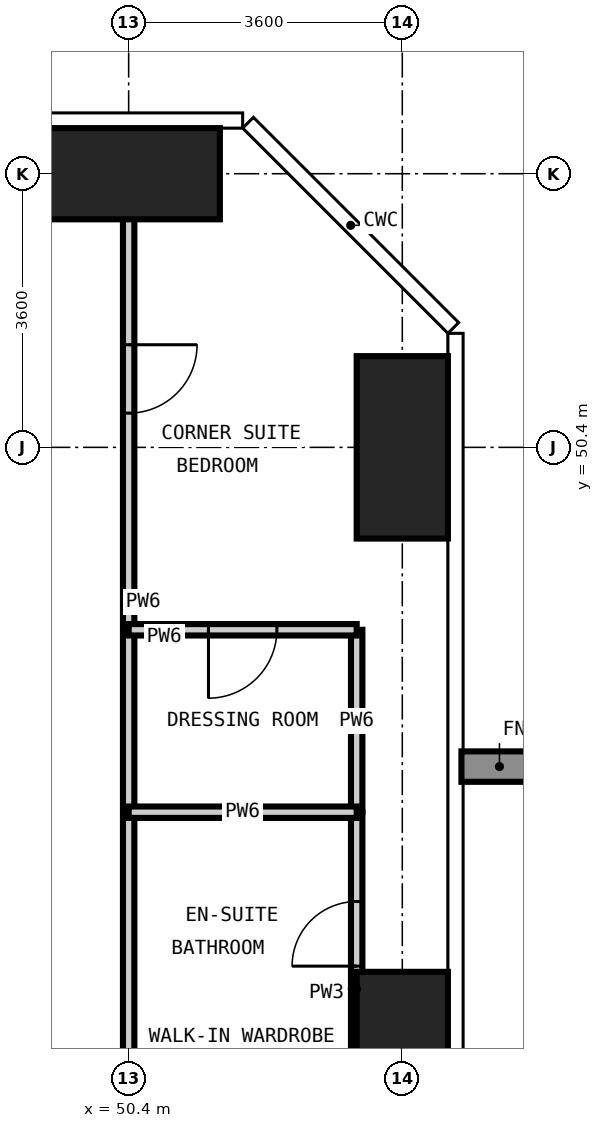
"""IFC4 building model, lengths in metres.
Left out: names, types, materials, properties, quantities, classifications, styles, units other than length and angle.
Written with IfcOpenShell. Run it as: python <this file> out.ifc"""

import sys

from ifc_helpers import new_model, si_unit, direction, frame, frame_2d, origin, origin_2d, place, context, subcontext, project, spatial, rectangle, extrude, element, fill, save


model = new_model("IFC4")
c1 = context("Model", 3, precision=1e-05, world=origin(), true_north=direction((0.0, 1.0)))
c2 = subcontext(c1, "Body", "Model", "MODEL_VIEW")
j1 = project(units=[si_unit("LENGTHUNIT", "METRE"), si_unit("PLANEANGLEUNIT", "RADIAN")], contexts=[c1])
p1 = place(None, origin())
s1 = spatial("IfcSite", under=j1, at=p1, CompositionType="ELEMENT")
p2 = place(p1, origin())
s2 = spatial("IfcBuilding", under=s1, at=p2, CompositionType="ELEMENT")
p3 = place(p2, frame((0.0, 0.0, 216.6)))
s3 = spatial("IfcBuildingStorey", under=s2, at=p3, CompositionType="ELEMENT", Elevation=216.6)
p4 = place(p3, frame((50.4, 54.0, -0.35), z_axis=(0.0, 0.0, 1.0), x_axis=(1.0, 0.0, 0.0)))
e1 = element("IfcColumn", 1, at=p4, inside=s3, PredefinedType="COLUMN", context=c2, shape_type="SweptSolid", body=[
    extrude(rectangle(XDim=2.4, YDim=1.2, at=origin_2d()), origin(), (0.0, 0.0, 1.0), 3.55),
])
p5 = place(p3, frame((54.0, 42.0, -0.35), z_axis=(0.0, 0.0, 1.0), x_axis=(1.0, 0.0, 0.0)))
e2 = element("IfcColumn", 2, at=p5, inside=s3, PredefinedType="COLUMN", context=c2, shape_type="SweptSolid", body=[
    extrude(rectangle(XDim=1.2, YDim=3.0, at=origin_2d()), origin(), (0.0, 0.0, 1.0), 3.55),
])
p6 = place(p3, frame((54.0, 50.4, -0.35), z_axis=(0.0, 0.0, 1.0), x_axis=(1.0, 0.0, 0.0)))
e3 = element("IfcColumn", 3, at=p6, inside=s3, PredefinedType="COLUMN", context=c2, shape_type="SweptSolid", body=[
    extrude(rectangle(XDim=1.2, YDim=2.4, at=origin_2d()), origin(), (0.0, 0.0, 1.0), 3.55),
])
p7 = place(p3, frame((53.4, 42.0, 0.0), z_axis=(0.0, 0.0, 1.0), x_axis=(0.0, 1.0, 0.0)))
e4 = element("IfcWall", 4, at=p7, inside=s3, PredefinedType="PARTITIONING", context=c2, shape_type="SweptSolid", body=[
    extrude(rectangle(XDim=3.6, YDim=0.15, at=frame_2d((1.8, 0.0))), origin(), (0.0, 0.0, 1.0), 3.2),
])
p8 = place(p7, frame((1.575, 0.0, 0.0)))
e5 = element("IfcOpeningElement", 5, at=p8, cuts=e4, PredefinedType="OPENING", context=c2, shape_type="SweptSolid", body=[
    extrude(rectangle(XDim=0.85, YDim=2.1, at=frame_2d((0.425, 1.05))), frame((0.0, 0.085, 0.0), z_axis=(0.0, -1.0, 0.0), x_axis=(1.0, 0.0, 0.0)), (0.0, 0.0, 1.0), 0.17),
])
p9 = place(p3, frame((50.4, 42.0, 0.0), z_axis=(0.0, 0.0, 1.0), x_axis=(0.0, 1.0, 0.0)))
e6 = element("IfcWall", 6, at=p9, inside=s3, PredefinedType="PARTITIONING", context=c2, shape_type="SweptSolid", body=[
    extrude(rectangle(XDim=12.618, YDim=0.15, at=frame_2d((6.309, 0.0))), origin(), (0.0, 0.0, 1.0), 3.2),
])
p10 = place(p9, frame((8.85, 0.0, 0.0)))
e7 = element("IfcOpeningElement", 7, at=p10, cuts=e6, PredefinedType="OPENING", context=c2, shape_type="SweptSolid", body=[
    extrude(rectangle(XDim=0.9, YDim=2.1, at=frame_2d((0.45, 1.05))), frame((0.0, 0.085, 0.0), z_axis=(0.0, -1.0, 0.0), x_axis=(1.0, 0.0, 0.0)), (0.0, 0.0, 1.0), 0.17),
])
p11 = place(p3, frame((53.4, 45.6, 0.0), z_axis=(0.0, 0.0, 1.0), x_axis=(0.0, 1.0, 0.0)))
e8 = element("IfcWall", 8, at=p11, inside=s3, PredefinedType="PARTITIONING", context=c2, shape_type="SweptSolid", body=[
    extrude(rectangle(XDim=2.4, YDim=0.15, at=frame_2d((1.2, 0.0))), origin(), (0.0, 0.0, 1.0), 3.2),
])
p12 = place(p3, frame((50.4, 45.6, 0.0), z_axis=(0.0, 0.0, 1.0), x_axis=(1.0, 0.0, 0.0)))
e9 = element("IfcWall", 9, at=p12, inside=s3, PredefinedType="PARTITIONING", context=c2, shape_type="SweptSolid", body=[
    extrude(rectangle(XDim=3.0, YDim=0.15, at=frame_2d((1.5, 0.0))), origin(), (0.0, 0.0, 1.0), 3.2),
])
p13 = place(p3, frame((50.4, 48.0, 0.0), z_axis=(0.0, 0.0, 1.0), x_axis=(1.0, 0.0, 0.0)))
e10 = element("IfcWall", 10, at=p13, inside=s3, PredefinedType="PARTITIONING", context=c2, shape_type="SweptSolid", body=[
    extrude(rectangle(XDim=3.0, YDim=0.15, at=frame_2d((1.5, 0.0))), origin(), (0.0, 0.0, 1.0), 3.2),
])
p14 = place(p13, frame((1.05, 0.0, 0.0)))
e11 = element("IfcOpeningElement", 11, at=p14, cuts=e10, PredefinedType="OPENING", context=c2, shape_type="SweptSolid", body=[
    extrude(rectangle(XDim=0.9, YDim=2.1, at=frame_2d((0.45, 1.05))), frame((0.0, 0.085, 0.0), z_axis=(0.0, -1.0, 0.0), x_axis=(1.0, 0.0, 0.0)), (0.0, 0.0, 1.0), 0.17),
])
p15 = place(p10, frame((0.9, 0.0, 0.0), z_axis=(0.0, 0.0, 1.0), x_axis=(-1.0, 0.0, 0.0)))
e12 = element("IfcDoor", 12, at=p15, inside=s3, OperationType="SINGLE_SWING_LEFT", PredefinedType="DOOR", context=c2, shape_type="SweptSolid", body=[
    extrude(rectangle(XDim=0.9, YDim=2.1, at=frame_2d((0.45, 1.05))), frame((0.0, 0.025, 0.0), z_axis=(0.0, -1.0, 0.0), x_axis=(1.0, 0.0, 0.0)), (0.0, 0.0, 1.0), 0.05),
])
fill(e7, e12)
p16 = place(p8, origin())
e13 = element("IfcDoor", 13, at=p16, inside=s3, OperationType="SINGLE_SWING_LEFT", PredefinedType="DOOR", context=c2, shape_type="SweptSolid", body=[
    extrude(rectangle(XDim=0.85, YDim=2.1, at=frame_2d((0.425, 1.05))), frame((0.0, 0.025, 0.0), z_axis=(0.0, -1.0, 0.0), x_axis=(1.0, 0.0, 0.0)), (0.0, 0.0, 1.0), 0.05),
])
fill(e5, e13)
p17 = place(p14, frame((0.9, 0.0, 0.0), z_axis=(0.0, 0.0, 1.0), x_axis=(-1.0, 0.0, 0.0)))
e14 = element("IfcDoor", 14, at=p17, inside=s3, OperationType="SINGLE_SWING_RIGHT", PredefinedType="DOOR", context=c2, shape_type="SweptSolid", body=[
    extrude(rectangle(XDim=0.9, YDim=2.1, at=frame_2d((0.45, 1.05))), frame((0.0, 0.025, 0.0), z_axis=(0.0, -1.0, 0.0), x_axis=(1.0, 0.0, 0.0)), (0.0, 0.0, 1.0), 0.05),
])
fill(e11, e14)
save(model, sys.argv[1])
